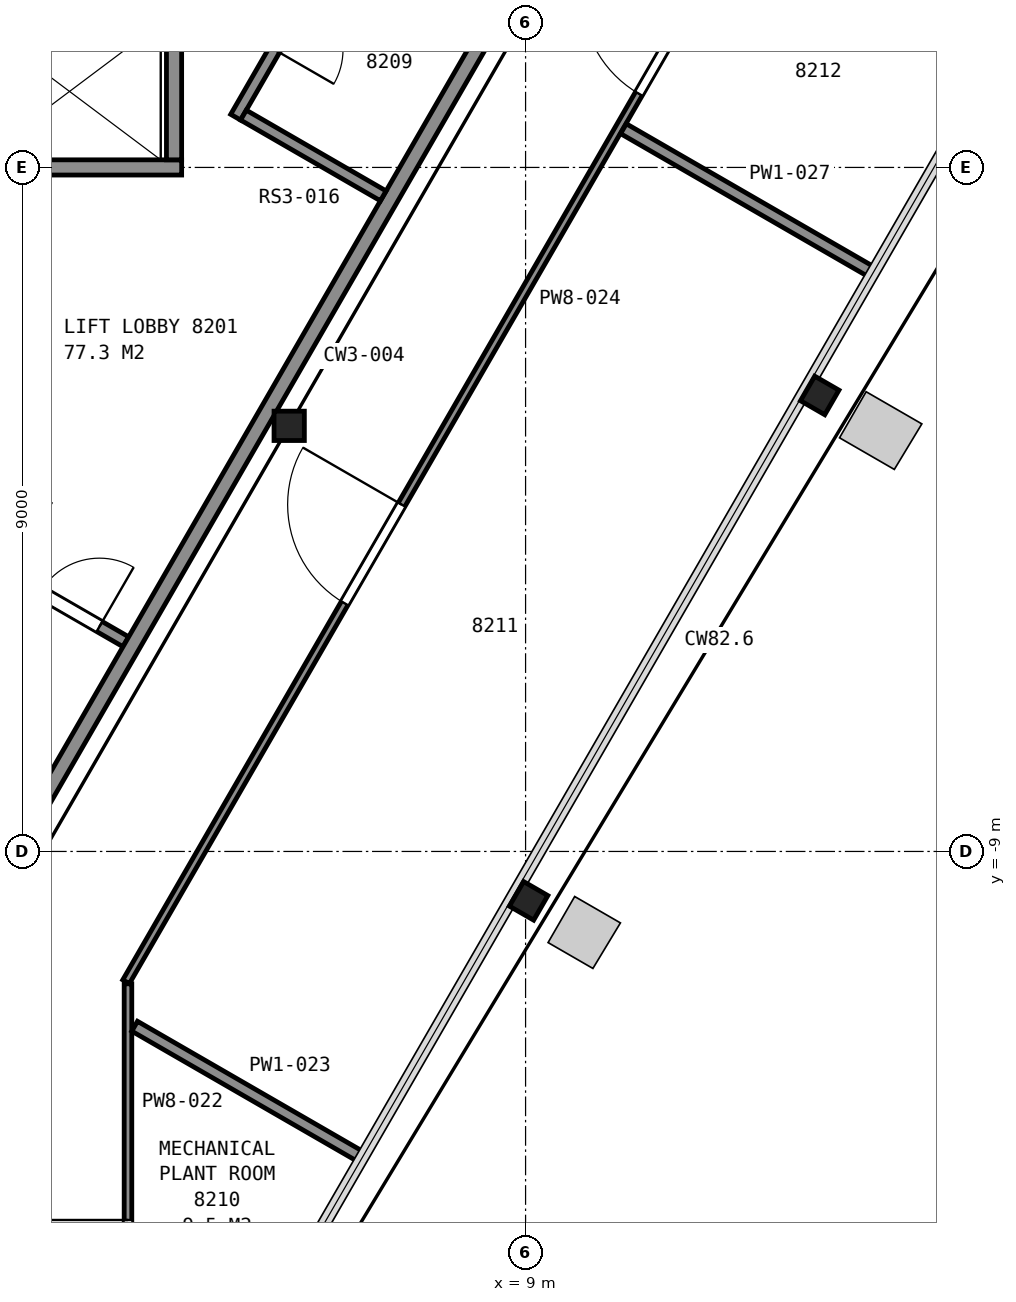
"""IFC4 building model, lengths in metres.
Left out: names, types, materials, properties, quantities, classifications, styles, units other than length and angle.
Written with IfcOpenShell. Run it as: python <this file> out.ifc"""

import sys

from ifc_helpers import new_model, si_unit, direction, frame, frame_2d, origin, origin_2d, place, context, subcontext, project, spatial, rectangle, i_section, extrude, element, fill, save


model = new_model("IFC4")
c1 = context("Model", 3, precision=1e-05, world=origin(), true_north=direction((0.0, 1.0)))
c2 = subcontext(c1, "Body", "Model", "MODEL_VIEW")
j1 = project(units=[si_unit("LENGTHUNIT", "METRE"), si_unit("PLANEANGLEUNIT", "RADIAN")], contexts=[c1])
p1 = place(None, origin())
s1 = spatial("IfcSite", under=j1, at=p1, CompositionType="ELEMENT")
p2 = place(p1, origin())
s2 = spatial("IfcBuilding", under=s1, at=p2, CompositionType="ELEMENT")
p3 = place(p2, frame((0.0, 0.0, 325.2)))
s3 = spatial("IfcBuildingStorey", under=s2, at=p3, CompositionType="ELEMENT", Elevation=325.2)
for number, where, z_axis, x_axis in (
    (1, (9.04, -9.65, 0.0), (0.0, 0.0, 1.0), (-0.5, -0.866, 0.0)),
    (2, (12.87, -3.0, 0.0), (0.0, 0.0, 1.0), (-0.5, -0.866, 0.0)),
):
    element("IfcColumn", number, at=place(p3, frame(where, z_axis=z_axis, x_axis=x_axis)), inside=s3, PredefinedType="COLUMN", context=c2, shape_type="SweptSolid", body=[
        extrude(i_section(OverallWidth=0.373, OverallDepth=0.368, WebThickness=0.015, FlangeThickness=0.024, FilletRadius=0.015, at=origin_2d()), origin(), (0.0, 0.0, 1.0), 4.2),
    ])
p4 = place(p3, frame((5.89, -3.4, 0.0), z_axis=(0.0, 0.0, 1.0), x_axis=(1.0, 0.0, 0.0)))
e3 = element("IfcColumn", 3, at=p4, inside=s3, PredefinedType="COLUMN", context=c2, shape_type="SweptSolid", body=[
    extrude(i_section(OverallWidth=0.399, OverallDepth=0.386, WebThickness=0.021, FlangeThickness=0.033, FilletRadius=0.015, at=origin_2d()), origin(), (0.0, 0.0, 1.0), 4.2),
])
p5 = place(p3, frame((1.525, 0.0, 0.0), z_axis=(0.0, 0.0, 1.0), x_axis=(1.0, 0.0, 0.0)))
e4 = element("IfcWall", 4, at=p5, inside=s3, PredefinedType="PARTITIONING", context=c2, shape_type="SweptSolid", body=[
    extrude(rectangle(XDim=2.95, YDim=0.2, at=frame_2d((1.475, 0.0))), origin(), (0.0, 0.0, 1.0), 4.2),
])
p6 = place(p3, frame((4.375, 0.1, 0.0), z_axis=(0.0, 0.0, 1.0), x_axis=(0.0, 1.0, 0.0)))
e5 = element("IfcWall", 5, at=p6, inside=s3, PredefinedType="PARTITIONING", context=c2, shape_type="SweptSolid", body=[
    extrude(rectangle(XDim=1.95, YDim=0.2, at=frame_2d((0.975, 0.0))), origin(), (0.0, 0.0, 1.0), 4.2),
])
p7 = place(p3, frame((3.74, -6.241, 0.0), z_axis=(0.0, 0.0, 1.0), x_axis=(-0.86609690551, 0.499876134923, 0.0)))
e6 = element("IfcWall", 6, at=p7, inside=s3, PredefinedType="PARTITIONING", context=c2, shape_type="SweptSolid", body=[
    extrude(rectangle(XDim=1.925, YDim=0.15, at=frame_2d((0.963, 0.0))), origin(), (0.0, 0.0, 1.0), 3.95),
])
p8 = place(p7, frame((0.4, 0.0, 0.0)))
e7 = element("IfcOpeningElement", 7, at=p8, cuts=e6, PredefinedType="OPENING", context=c2, shape_type="SweptSolid", body=[
    extrude(rectangle(XDim=0.9, YDim=2.1, at=frame_2d((0.45, 1.05))), frame((0.0, 0.085, 0.0), z_axis=(0.0, -1.0, 0.0), x_axis=(1.0, 0.0, 0.0)), (0.0, 0.0, 1.0), 0.17),
])
p9 = place(p3, frame((2.552, -8.5, 0.0), z_axis=(0.0, 0.0, 1.0), x_axis=(0.499981156672, 0.866036282712, 0.0)))
e8 = element("IfcWall", 8, at=p9, inside=s3, PredefinedType="PARTITIONING", context=c2, shape_type="SweptSolid", body=[
    extrude(rectangle(XDim=13.915, YDim=0.2, at=frame_2d((6.957, 0.0))), origin(), (0.0, 0.0, 1.0), 3.95),
])
p10 = place(p3, frame((6.66, 3.216, 0.0), z_axis=(0.0, 0.0, 1.0), x_axis=(-0.499939757307, -0.866060182126, 0.0)))
e9 = element("IfcWall", 9, at=p10, inside=s3, PredefinedType="PARTITIONING", context=c2, shape_type="SweptSolid", body=[
    extrude(rectangle(XDim=2.95, YDim=0.15, at=frame_2d((1.475, 0.0))), origin(), (0.0, 0.0, 1.0), 3.95),
])
p11 = place(p10, frame((1.025, 0.0, 0.0)))
e10 = element("IfcOpeningElement", 10, at=p11, cuts=e9, PredefinedType="OPENING", context=c2, shape_type="SweptSolid", body=[
    extrude(rectangle(XDim=0.9, YDim=2.1, at=frame_2d((0.45, 1.05))), frame((0.0, 0.085, 0.0), z_axis=(0.0, -1.0, 0.0), x_axis=(1.0, 0.0, 0.0)), (0.0, 0.0, 1.0), 0.17),
])
p12 = place(p3, frame((5.288, 0.688, 0.0), z_axis=(0.0, 0.0, 1.0), x_axis=(0.8659425006, -0.500143565044, 0.0)))
e11 = element("IfcWall", 11, at=p12, inside=s3, PredefinedType="PARTITIONING", context=c2, shape_type="SweptSolid", body=[
    extrude(rectangle(XDim=2.125, YDim=0.15, at=frame_2d((1.062, 0.0))), origin(), (0.0, 0.0, 1.0), 3.95),
])
p13 = place(p3, frame((3.769, -10.741, 0.0), z_axis=(0.0, 0.0, 1.0), x_axis=(0.0, -1.0, 0.0)))
e12 = element("IfcWall", 12, at=p13, inside=s3, PredefinedType="PARTITIONING", context=c2, shape_type="SweptSolid", body=[
    extrude(rectangle(XDim=7.512, YDim=0.1, at=frame_2d((3.756, 0.0))), origin(), (0.0, 0.0, 1.0), 3.297),
])
p14 = place(p13, frame((3.108, 0.0, 0.0)))
e13 = element("IfcOpeningElement", 13, at=p14, cuts=e12, PredefinedType="OPENING", context=c2, shape_type="SweptSolid", body=[
    extrude(rectangle(XDim=1.5, YDim=2.1, at=frame_2d((0.75, 1.05))), frame((0.0, 0.06, 0.0), z_axis=(0.0, -1.0, 0.0), x_axis=(1.0, 0.0, 0.0)), (0.0, 0.0, 1.0), 0.12),
])
p15 = place(p3, frame((3.856, -11.3, 0.0), z_axis=(0.0, 0.0, 1.0), x_axis=(0.866084061191, -0.499898388626, 0.0)))
e14 = element("IfcWall", 14, at=p15, inside=s3, PredefinedType="PARTITIONING", context=c2, shape_type="SweptSolid", body=[
    extrude(rectangle(XDim=3.444, YDim=0.15, at=frame_2d((1.722, 0.0))), origin(), (0.0, 0.0, 1.0), 3.297),
])
p16 = place(p3, frame((11.521, 2.754, 0.0), z_axis=(0.0, 0.0, 1.0), x_axis=(-0.500044034969, -0.86599997869, 0.0)))
e15 = element("IfcWall", 15, at=p16, inside=s3, PredefinedType="PARTITIONING", context=c2, shape_type="SweptSolid", body=[
    extrude(rectangle(XDim=15.553, YDim=0.1, at=frame_2d((7.776, 0.0))), origin(), (0.0, 0.0, 1.0), 3.297),
])
p17 = place(p16, frame((8.303, 0.0, 0.0)))
e16 = element("IfcOpeningElement", 16, at=p17, cuts=e15, PredefinedType="OPENING", context=c2, shape_type="SweptSolid", body=[
    extrude(rectangle(XDim=1.5, YDim=2.1, at=frame_2d((0.75, 1.05))), frame((0.0, 0.06, 0.0), z_axis=(0.0, -1.0, 0.0), x_axis=(1.0, 0.0, 0.0)), (0.0, 0.0, 1.0), 0.12),
])
p18 = place(p16, frame((0.561, 0.0, 0.0)))
e17 = element("IfcOpeningElement", 17, at=p18, cuts=e15, PredefinedType="OPENING", context=c2, shape_type="SweptSolid", body=[
    extrude(rectangle(XDim=1.5, YDim=2.1, at=frame_2d((0.75, 1.05))), frame((0.0, 0.06, 0.0), z_axis=(0.0, -1.0, 0.0), x_axis=(1.0, 0.0, 0.0)), (0.0, 0.0, 1.0), 0.12),
])
p19 = place(p3, frame((10.288, 0.51, 0.0), z_axis=(0.0, 0.0, 1.0), x_axis=(0.865987581393, -0.500065504582, 0.0)))
e18 = element("IfcWall", 18, at=p19, inside=s3, PredefinedType="PARTITIONING", context=c2, shape_type="SweptSolid", body=[
    extrude(rectangle(XDim=3.778, YDim=0.15, at=frame_2d((1.889, 0.0))), origin(), (0.0, 0.0, 1.0), 3.297),
])
p20 = place(p8, origin())
e19 = element("IfcDoor", 19, at=p20, inside=s3, OperationType="SINGLE_SWING_LEFT", PredefinedType="DOOR", context=c2, shape_type="SweptSolid", body=[
    extrude(rectangle(XDim=0.9, YDim=2.1, at=frame_2d((0.45, 1.05))), frame((0.0, 0.025, 0.0), z_axis=(0.0, -1.0, 0.0), x_axis=(1.0, 0.0, 0.0)), (0.0, 0.0, 1.0), 0.05),
])
fill(e7, e19)
p21 = place(p14, origin())
e20 = element("IfcDoor", 20, at=p21, inside=s3, OperationType="DOUBLE_DOOR_SINGLE_SWING", PredefinedType="DOOR", context=c2, shape_type="SweptSolid", body=[
    extrude(rectangle(XDim=1.5, YDim=2.1, at=frame_2d((0.75, 1.05))), frame((0.0, 0.025, 0.0), z_axis=(0.0, -1.0, 0.0), x_axis=(1.0, 0.0, 0.0)), (0.0, 0.0, 1.0), 0.05),
])
fill(e13, e20)
p22 = place(p17, origin())
e21 = element("IfcDoor", 21, at=p22, inside=s3, OperationType="DOUBLE_DOOR_SINGLE_SWING", PredefinedType="DOOR", context=c2, shape_type="SweptSolid", body=[
    extrude(rectangle(XDim=1.5, YDim=2.1, at=frame_2d((0.75, 1.05))), frame((0.0, 0.025, 0.0), z_axis=(0.0, -1.0, 0.0), x_axis=(1.0, 0.0, 0.0)), (0.0, 0.0, 1.0), 0.05),
])
fill(e16, e21)
p23 = place(p18, origin())
e22 = element("IfcDoor", 22, at=p23, inside=s3, OperationType="DOUBLE_DOOR_SINGLE_SWING", PredefinedType="DOOR", context=c2, shape_type="SweptSolid", body=[
    extrude(rectangle(XDim=1.5, YDim=2.1, at=frame_2d((0.75, 1.05))), frame((0.0, 0.025, 0.0), z_axis=(0.0, -1.0, 0.0), x_axis=(1.0, 0.0, 0.0)), (0.0, 0.0, 1.0), 0.05),
])
fill(e17, e22)
save(model, sys.argv[1])
